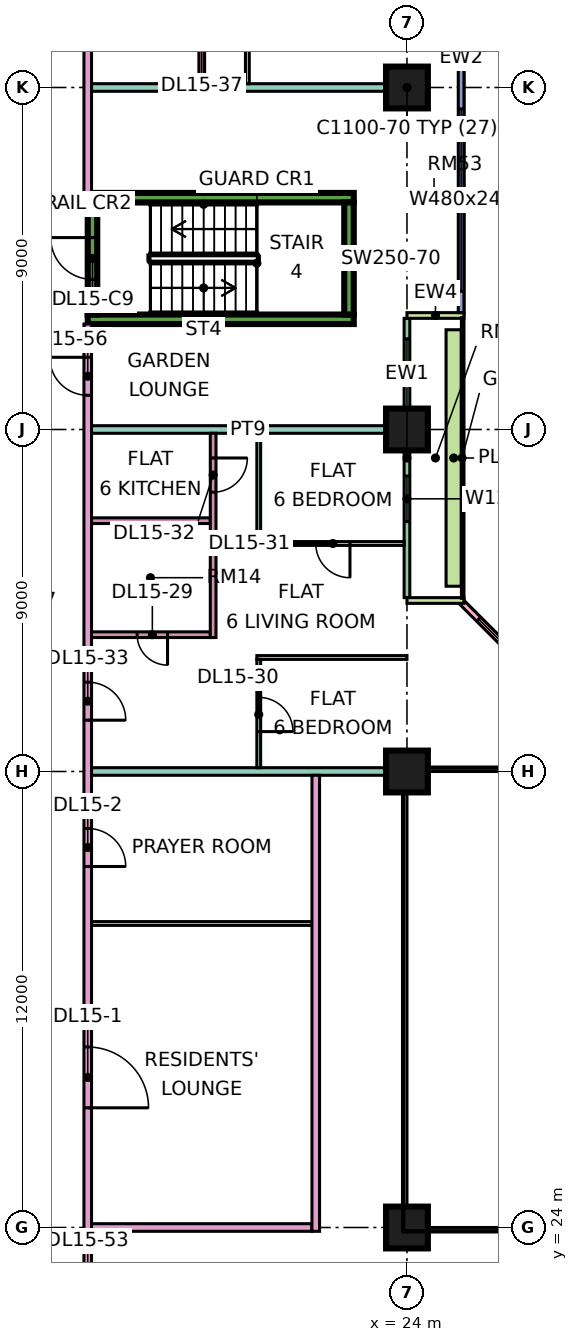
"""IFC4 building model, lengths in metres.
Left out: names, types, materials, properties, quantities, classifications, styles, units other than length and angle.
Written with IfcOpenShell. Run it as: python <this file> out.ifc"""

import sys

from ifc_helpers import new_model, si_unit, direction, frame, frame_2d, origin, origin_2d, place, context, subcontext, project, spatial, rectangle, extrude, element, fill, save


model = new_model("IFC4")
c1 = context("Model", 3, precision=1e-05, world=origin(), true_north=direction((0.0, 1.0)))
c2 = subcontext(c1, "Body", "Model", "MODEL_VIEW")
j1 = project(units=[si_unit("LENGTHUNIT", "METRE"), si_unit("PLANEANGLEUNIT", "RADIAN")], contexts=[c1])
p1 = place(None, origin())
s1 = spatial("IfcSite", under=j1, at=p1, CompositionType="ELEMENT")
p2 = place(p1, origin())
s2 = spatial("IfcBuilding", under=s1, at=p2, CompositionType="ELEMENT")
p3 = place(p2, frame((0.0, 0.0, 71.4)))
s3 = spatial("IfcBuildingStorey", under=s2, at=p3, CompositionType="ELEMENT", Elevation=71.4)
for number, where, z_axis, x_axis in (
    (1, (24.0, 24.0, 0.0), (0.0, 0.0, 1.0), (1.0, 0.0, 0.0)),
    (2, (24.0, 36.0, 0.0), (0.0, 0.0, 1.0), (1.0, 0.0, 0.0)),
    (3, (24.0, 45.0, 0.0), (0.0, 0.0, 1.0), (1.0, 0.0, 0.0)),
    (4, (24.0, 54.0, 0.0), (0.0, 0.0, 1.0), (1.0, 0.0, 0.0)),
):
    element("IfcColumn", number, at=place(p3, frame(where, z_axis=z_axis, x_axis=x_axis)), inside=s3, PredefinedType="COLUMN", context=c2, shape_type="SweptSolid", body=[
        extrude(rectangle(XDim=1.1, YDim=1.1, at=origin_2d()), origin(), (0.0, 0.0, 1.0), 3.75),
    ])
for number, where, z_axis, x_axis in (
    (5, (15.6, 47.9, 0.0), (0.0, 0.0, 1.0), (1.0, 0.0, 0.0)),
    (6, (15.6, 51.1, 0.0), (0.0, 0.0, 1.0), (1.0, 0.0, 0.0)),
):
    element("IfcWall", number, at=place(p3, frame(where, z_axis=z_axis, x_axis=x_axis)), inside=s3, PredefinedType="SHEAR", context=c2, shape_type="SweptSolid", body=[
        extrude(rectangle(XDim=7.0, YDim=0.25, at=frame_2d((3.5, 0.0))), origin(), (0.0, 0.0, 1.0), 3.75),
    ])
p4 = place(p3, frame((15.725, 48.025, 0.0), z_axis=(0.0, 0.0, 1.0), x_axis=(0.0, 1.0, 0.0)))
e7 = element("IfcWall", 7, at=p4, inside=s3, PredefinedType="SHEAR", context=c2, shape_type="SweptSolid", body=[
    extrude(rectangle(XDim=2.95, YDim=0.25, at=frame_2d((1.475, 0.0))), origin(), (0.0, 0.0, 1.0), 3.75),
])
p5 = place(p4, frame((0.925, 0.0, 0.0)))
e8 = element("IfcOpeningElement", 8, at=p5, cuts=e7, PredefinedType="OPENING", context=c2, shape_type="SweptSolid", body=[
    extrude(rectangle(XDim=1.1, YDim=2.2, at=frame_2d((0.55, 1.1))), frame((0.0, 0.135, 0.0), z_axis=(0.0, -1.0, 0.0), x_axis=(1.0, 0.0, 0.0)), (0.0, 0.0, 1.0), 0.27),
])
p6 = place(p3, frame((22.475, 48.025, 0.0), z_axis=(0.0, 0.0, 1.0), x_axis=(0.0, 1.0, 0.0)))
e9 = element("IfcWall", 9, at=p6, inside=s3, PredefinedType="SHEAR", context=c2, shape_type="SweptSolid", body=[
    extrude(rectangle(XDim=2.95, YDim=0.25, at=frame_2d((1.475, 0.0))), origin(), (0.0, 0.0, 1.0), 3.75),
])
p7 = place(p3, frame((28.447, 37.447, 0.0), z_axis=(0.0, 0.0, 1.0), x_axis=(-0.707106781187, 0.707106781187, 0.0)))
e10 = element("IfcWall", 10, at=p7, inside=s3, PredefinedType="SOLIDWALL", context=c2, shape_type="SweptSolid", body=[
    extrude(rectangle(XDim=4.243, YDim=0.15, at=frame_2d((2.121, 0.0))), origin(), (0.0, 0.0, 1.0), 3.35),
])
p8 = place(p7, frame((0.621, 0.0, 0.45)))
e11 = element("IfcOpeningElement", 11, at=p8, cuts=e10, PredefinedType="OPENING", context=c2, shape_type="SweptSolid", body=[
    extrude(rectangle(XDim=3.0, YDim=2.4, at=frame_2d((1.5, 1.2))), frame((0.0, 0.085, 0.0), z_axis=(0.0, -1.0, 0.0), x_axis=(1.0, 0.0, 0.0)), (0.0, 0.0, 1.0), 0.17),
])
p9 = place(p3, frame((24.0, 40.575, 0.0), z_axis=(0.0, 0.0, 1.0), x_axis=(0.0, 1.0, 0.0)))
e12 = element("IfcWall", 12, at=p9, inside=s3, PredefinedType="SOLIDWALL", context=c2, shape_type="SweptSolid", body=[
    extrude(rectangle(XDim=7.35, YDim=0.15, at=frame_2d((3.675, 0.0))), origin(), (0.0, 0.0, 1.0), 3.35),
])
p10 = place(p9, frame((2.0, 0.0, 0.45)))
e13 = element("IfcOpeningElement", 13, at=p10, cuts=e12, PredefinedType="OPENING", context=c2, shape_type="SweptSolid", body=[
    extrude(rectangle(XDim=1.2, YDim=2.4, at=frame_2d((0.6, 1.2))), frame((0.0, 0.085, 0.0), z_axis=(0.0, -1.0, 0.0), x_axis=(1.0, 0.0, 0.0)), (0.0, 0.0, 1.0), 0.17),
])
p11 = place(p9, frame((5.613, 0.0, 0.45)))
e14 = element("IfcOpeningElement", 14, at=p11, cuts=e12, PredefinedType="OPENING", context=c2, shape_type="SweptSolid", body=[
    extrude(rectangle(XDim=1.2, YDim=2.4, at=frame_2d((0.6, 1.2))), frame((0.0, 0.085, 0.0), z_axis=(0.0, -1.0, 0.0), x_axis=(1.0, 0.0, 0.0)), (0.0, 0.0, 1.0), 0.17),
])
for number, where, z_axis, x_axis in (
    (15, (25.5, 40.5, 0.0), (0.0, 0.0, 1.0), (-1.0, 0.0, 0.0)),
    (16, (25.5, 48.0, 0.0), (0.0, 0.0, 1.0), (-1.0, 0.0, 0.0)),
):
    element("IfcWall", number, at=place(p3, frame(where, z_axis=z_axis, x_axis=x_axis)), inside=s3, PredefinedType="SOLIDWALL", context=c2, shape_type="SweptSolid", body=[
        extrude(rectangle(XDim=1.5, YDim=0.15, at=frame_2d((0.75, 0.0))), origin(), (0.0, 0.0, 1.0), 3.35),
    ])
p12 = place(p3, frame((25.425, 48.075, 0.0), z_axis=(0.0, 0.0, 1.0), x_axis=(0.0, 1.0, 0.0)))
e17 = element("IfcWall", 17, at=p12, inside=s3, PredefinedType="SOLIDWALL", context=c2, shape_type="SweptSolid", body=[
    extrude(rectangle(XDim=13.425, YDim=0.15, at=frame_2d((6.712, 0.0))), origin(), (0.0, 0.0, 1.0), 3.35),
])
p13 = place(p12, frame((0.562, 0.0, 0.45)))
e18 = element("IfcOpeningElement", 18, at=p13, cuts=e17, PredefinedType="OPENING", context=c2, shape_type="SweptSolid", body=[
    extrude(rectangle(XDim=4.8, YDim=2.4, at=frame_2d((2.4, 1.2))), frame((0.0, 0.085, 0.0), z_axis=(0.0, -1.0, 0.0), x_axis=(1.0, 0.0, 0.0)), (0.0, 0.0, 1.0), 0.17),
])
p14 = place(p12, frame((6.525, 0.0, 0.45)))
e19 = element("IfcOpeningElement", 19, at=p14, cuts=e17, PredefinedType="OPENING", context=c2, shape_type="SweptSolid", body=[
    extrude(rectangle(XDim=1.8, YDim=2.4, at=frame_2d((0.9, 1.2))), frame((0.0, 0.085, 0.0), z_axis=(0.0, -1.0, 0.0), x_axis=(1.0, 0.0, 0.0)), (0.0, 0.0, 1.0), 0.17),
])
p15 = place(p12, frame((9.525, 0.0, 0.45)))
e20 = element("IfcOpeningElement", 20, at=p15, cuts=e17, PredefinedType="OPENING", context=c2, shape_type="SweptSolid", body=[
    extrude(rectangle(XDim=1.8, YDim=2.4, at=frame_2d((0.9, 1.2))), frame((0.0, 0.085, 0.0), z_axis=(0.0, -1.0, 0.0), x_axis=(1.0, 0.0, 0.0)), (0.0, 0.0, 1.0), 0.17),
])
p16 = place(p3, frame((25.229, 40.875, 0.0), z_axis=(0.0, 0.0, 1.0), x_axis=(0.0, 1.0, 0.0)))
e21 = element("IfcWall", 21, at=p16, inside=s3, PredefinedType="SOLIDWALL", context=c2, shape_type="SweptSolid", body=[
    extrude(rectangle(XDim=6.75, YDim=0.4, at=frame_2d((3.375, 0.0))), origin(), (0.0, 0.0, 1.0), 0.7),
])
p17 = place(p3, frame((15.6, 20.0, 0.0), z_axis=(0.0, 0.0, 1.0), x_axis=(0.0, 1.0, 0.0)))
e22 = element("IfcWall", 22, at=p17, inside=s3, PredefinedType="PARTITIONING", context=c2, shape_type="SweptSolid", body=[
    extrude(rectangle(XDim=27.775, YDim=0.2, at=frame_2d((13.887, 0.0))), origin(), (0.0, 0.0, 1.0), 3.35),
])
p18 = place(p17, frame((7.15, 0.0, 0.0)))
e23 = element("IfcOpeningElement", 23, at=p18, cuts=e22, PredefinedType="OPENING", context=c2, shape_type="SweptSolid", body=[
    extrude(rectangle(XDim=1.6, YDim=2.1, at=frame_2d((0.8, 1.05))), frame((0.0, 0.11, 0.0), z_axis=(0.0, -1.0, 0.0), x_axis=(1.0, 0.0, 0.0)), (0.0, 0.0, 1.0), 0.22),
])
p19 = place(p17, frame((13.5, 0.0, 0.0)))
e24 = element("IfcOpeningElement", 24, at=p19, cuts=e22, PredefinedType="OPENING", context=c2, shape_type="SweptSolid", body=[
    extrude(rectangle(XDim=1.0, YDim=2.1, at=frame_2d((0.5, 1.05))), frame((0.0, 0.11, 0.0), z_axis=(0.0, -1.0, 0.0), x_axis=(1.0, 0.0, 0.0)), (0.0, 0.0, 1.0), 0.22),
])
p20 = place(p17, frame((17.35, 0.0, 0.0)))
e25 = element("IfcOpeningElement", 25, at=p20, cuts=e22, PredefinedType="OPENING", context=c2, shape_type="SweptSolid", body=[
    extrude(rectangle(XDim=1.0, YDim=2.1, at=frame_2d((0.5, 1.05))), frame((0.0, 0.11, 0.0), z_axis=(0.0, -1.0, 0.0), x_axis=(1.0, 0.0, 0.0)), (0.0, 0.0, 1.0), 0.22),
])
p21 = place(p17, frame((1.15, 0.0, 0.0)))
e26 = element("IfcOpeningElement", 26, at=p21, cuts=e22, PredefinedType="OPENING", context=c2, shape_type="SweptSolid", body=[
    extrude(rectangle(XDim=1.8, YDim=2.1, at=frame_2d((0.9, 1.05))), frame((0.0, 0.11, 0.0), z_axis=(0.0, -1.0, 0.0), x_axis=(1.0, 0.0, 0.0)), (0.0, 0.0, 1.0), 0.22),
])
p22 = place(p17, frame((25.9, 0.0, 0.0)))
e27 = element("IfcOpeningElement", 27, at=p22, cuts=e22, PredefinedType="OPENING", context=c2, shape_type="SweptSolid", body=[
    extrude(rectangle(XDim=1.0, YDim=2.1, at=frame_2d((0.5, 1.05))), frame((0.0, 0.11, 0.0), z_axis=(0.0, -1.0, 0.0), x_axis=(1.0, 0.0, 0.0)), (0.0, 0.0, 1.0), 0.22),
])
p23 = place(p3, frame((15.6, 51.225, 0.0), z_axis=(0.0, 0.0, 1.0), x_axis=(0.0, 1.0, 0.0)))
e28 = element("IfcWall", 28, at=p23, inside=s3, PredefinedType="PARTITIONING", context=c2, shape_type="SweptSolid", body=[
    extrude(rectangle(XDim=11.701, YDim=0.2, at=frame_2d((5.851, 0.0))), origin(), (0.0, 0.0, 1.0), 3.35),
])
p24 = place(p23, frame((9.825, 0.0, 0.0)))
e29 = element("IfcOpeningElement", 29, at=p24, cuts=e28, PredefinedType="OPENING", context=c2, shape_type="SweptSolid", body=[
    extrude(rectangle(XDim=1.0, YDim=2.1, at=frame_2d((0.5, 1.05))), frame((0.0, 0.11, 0.0), z_axis=(0.0, -1.0, 0.0), x_axis=(1.0, 0.0, 0.0)), (0.0, 0.0, 1.0), 0.22),
])
p25 = place(p3, frame((15.7, 24.0, 0.0), z_axis=(0.0, 0.0, 1.0), x_axis=(1.0, 0.0, 0.0)))
e30 = element("IfcWall", 30, at=p25, inside=s3, PredefinedType="PARTITIONING", context=c2, shape_type="SweptSolid", body=[
    extrude(rectangle(XDim=5.8, YDim=0.2, at=frame_2d((2.9, 0.0))), origin(), (0.0, 0.0, 1.0), 3.35),
])
p26 = place(p3, frame((15.7, 32.0, 0.0), z_axis=(0.0, 0.0, 1.0), x_axis=(1.0, 0.0, 0.0)))
e31 = element("IfcWall", 31, at=p26, inside=s3, PredefinedType="PARTITIONING", context=c2, shape_type="SweptSolid", body=[
    extrude(rectangle(XDim=5.8, YDim=0.1, at=frame_2d((2.9, 0.0))), origin(), (0.0, 0.0, 1.0), 3.35),
])
p27 = place(p3, frame((15.7, 36.0, 0.0), z_axis=(0.0, 0.0, 1.0), x_axis=(1.0, 0.0, 0.0)))
e32 = element("IfcWall", 32, at=p27, inside=s3, PredefinedType="PARTITIONING", context=c2, shape_type="SweptSolid", body=[
    extrude(rectangle(XDim=8.3, YDim=0.2, at=frame_2d((4.15, 0.0))), origin(), (0.0, 0.0, 1.0), 3.35),
])
p28 = place(p3, frame((15.7, 39.6, 0.0), z_axis=(0.0, 0.0, 1.0), x_axis=(1.0, 0.0, 0.0)))
e33 = element("IfcWall", 33, at=p28, inside=s3, PredefinedType="PARTITIONING", context=c2, shape_type="SweptSolid", body=[
    extrude(rectangle(XDim=3.125, YDim=0.15, at=frame_2d((1.562, 0.0))), origin(), (0.0, 0.0, 1.0), 3.35),
])
p29 = place(p28, frame((1.2, 0.0, 0.0)))
e34 = element("IfcOpeningElement", 34, at=p29, cuts=e33, PredefinedType="OPENING", context=c2, shape_type="SweptSolid", body=[
    extrude(rectangle(XDim=0.8, YDim=2.1, at=frame_2d((0.4, 1.05))), frame((0.0, 0.085, 0.0), z_axis=(0.0, -1.0, 0.0), x_axis=(1.0, 0.0, 0.0)), (0.0, 0.0, 1.0), 0.17),
])
p30 = place(p3, frame((15.7, 42.6, 0.0), z_axis=(0.0, 0.0, 1.0), x_axis=(1.0, 0.0, 0.0)))
e35 = element("IfcWall", 35, at=p30, inside=s3, PredefinedType="PARTITIONING", context=c2, shape_type="SweptSolid", body=[
    extrude(rectangle(XDim=3.125, YDim=0.15, at=frame_2d((1.562, 0.0))), origin(), (0.0, 0.0, 1.0), 3.35),
])
p31 = place(p3, frame((15.7, 45.0, 0.0), z_axis=(0.0, 0.0, 1.0), x_axis=(1.0, 0.0, 0.0)))
e36 = element("IfcWall", 36, at=p31, inside=s3, PredefinedType="PARTITIONING", context=c2, shape_type="SweptSolid", body=[
    extrude(rectangle(XDim=8.226, YDim=0.2, at=frame_2d((4.113, 0.0))), origin(), (0.0, 0.0, 1.0), 3.35),
])
p32 = place(p3, frame((15.7, 54.0, 0.0), z_axis=(0.0, 0.0, 1.0), x_axis=(1.0, 0.0, 0.0)))
e37 = element("IfcWall", 37, at=p32, inside=s3, PredefinedType="PARTITIONING", context=c2, shape_type="SweptSolid", body=[
    extrude(rectangle(XDim=8.3, YDim=0.2, at=frame_2d((4.15, 0.0))), origin(), (0.0, 0.0, 1.0), 3.35),
])
p33 = place(p3, frame((18.6, 54.1, 0.0), z_axis=(0.0, 0.0, 1.0), x_axis=(0.0, 1.0, 0.0)))
e38 = element("IfcWall", 38, at=p33, inside=s3, PredefinedType="PARTITIONING", context=c2, shape_type="SweptSolid", body=[
    extrude(rectangle(XDim=5.975, YDim=0.15, at=frame_2d((2.987, 0.0))), origin(), (0.0, 0.0, 1.0), 3.35),
])
p34 = place(p33, frame((1.1, 0.0, 0.0)))
e39 = element("IfcOpeningElement", 39, at=p34, cuts=e38, PredefinedType="OPENING", context=c2, shape_type="SweptSolid", body=[
    extrude(rectangle(XDim=0.9, YDim=2.1, at=frame_2d((0.45, 1.05))), frame((0.0, 0.085, 0.0), z_axis=(0.0, -1.0, 0.0), x_axis=(1.0, 0.0, 0.0)), (0.0, 0.0, 1.0), 0.17),
])
p35 = place(p3, frame((18.9, 39.525, 0.0), z_axis=(0.0, 0.0, 1.0), x_axis=(0.0, 1.0, 0.0)))
e40 = element("IfcWall", 40, at=p35, inside=s3, PredefinedType="PARTITIONING", context=c2, shape_type="SweptSolid", body=[
    extrude(rectangle(XDim=5.375, YDim=0.15, at=frame_2d((2.688, 0.0))), origin(), (0.0, 0.0, 1.0), 3.35),
])
p36 = place(p35, frame((3.825, 0.0, 0.0)))
e41 = element("IfcOpeningElement", 41, at=p36, cuts=e40, PredefinedType="OPENING", context=c2, shape_type="SweptSolid", body=[
    extrude(rectangle(XDim=0.9, YDim=2.1, at=frame_2d((0.45, 1.05))), frame((0.0, 0.085, 0.0), z_axis=(0.0, -1.0, 0.0), x_axis=(1.0, 0.0, 0.0)), (0.0, 0.0, 1.0), 0.17),
])
p37 = place(p3, frame((19.8, 54.1, 0.0), z_axis=(0.0, 0.0, 1.0), x_axis=(0.0, 1.0, 0.0)))
e42 = element("IfcWall", 42, at=p37, inside=s3, PredefinedType="PARTITIONING", context=c2, shape_type="SweptSolid", body=[
    extrude(rectangle(XDim=5.95, YDim=0.1, at=frame_2d((2.975, 0.0))), origin(), (0.0, 0.0, 1.0), 3.35),
])
p38 = place(p37, frame((0.95, 0.0, 0.0)))
e43 = element("IfcOpeningElement", 43, at=p38, cuts=e42, PredefinedType="OPENING", context=c2, shape_type="SweptSolid", body=[
    extrude(rectangle(XDim=0.9, YDim=2.1, at=frame_2d((0.45, 1.05))), frame((0.0, 0.06, 0.0), z_axis=(0.0, -1.0, 0.0), x_axis=(1.0, 0.0, 0.0)), (0.0, 0.0, 1.0), 0.12),
])
p39 = place(p3, frame((20.05, 39.0, 0.0), z_axis=(0.0, 0.0, 1.0), x_axis=(1.0, 0.0, 0.0)))
e44 = element("IfcWall", 44, at=p39, inside=s3, PredefinedType="PARTITIONING", context=c2, shape_type="SweptSolid", body=[
    extrude(rectangle(XDim=3.95, YDim=0.1, at=frame_2d((1.975, 0.0))), origin(), (0.0, 0.0, 1.0), 3.35),
])
p40 = place(p3, frame((20.05, 42.0, 0.0), z_axis=(0.0, 0.0, 1.0), x_axis=(1.0, 0.0, 0.0)))
e45 = element("IfcWall", 45, at=p40, inside=s3, PredefinedType="PARTITIONING", context=c2, shape_type="SweptSolid", body=[
    extrude(rectangle(XDim=3.876, YDim=0.1, at=frame_2d((1.938, 0.0))), origin(), (0.0, 0.0, 1.0), 3.35),
])
p41 = place(p40, frame((1.55, 0.0, 0.0)))
e46 = element("IfcOpeningElement", 46, at=p41, cuts=e45, PredefinedType="OPENING", context=c2, shape_type="SweptSolid", body=[
    extrude(rectangle(XDim=0.9, YDim=2.1, at=frame_2d((0.45, 1.05))), frame((0.0, 0.06, 0.0), z_axis=(0.0, -1.0, 0.0), x_axis=(1.0, 0.0, 0.0)), (0.0, 0.0, 1.0), 0.12),
])
p42 = place(p3, frame((20.1, 36.1, 0.0), z_axis=(0.0, 0.0, 1.0), x_axis=(0.0, 1.0, 0.0)))
e47 = element("IfcWall", 47, at=p42, inside=s3, PredefinedType="PARTITIONING", context=c2, shape_type="SweptSolid", body=[
    extrude(rectangle(XDim=2.85, YDim=0.1, at=frame_2d((1.425, 0.0))), origin(), (0.0, 0.0, 1.0), 3.35),
])
p43 = place(p42, frame((0.95, 0.0, 0.0)))
e48 = element("IfcOpeningElement", 48, at=p43, cuts=e47, PredefinedType="OPENING", context=c2, shape_type="SweptSolid", body=[
    extrude(rectangle(XDim=0.9, YDim=2.1, at=frame_2d((0.45, 1.05))), frame((0.0, 0.06, 0.0), z_axis=(0.0, -1.0, 0.0), x_axis=(1.0, 0.0, 0.0)), (0.0, 0.0, 1.0), 0.12),
])
p44 = place(p3, frame((20.1, 42.05, 0.0), z_axis=(0.0, 0.0, 1.0), x_axis=(0.0, 1.0, 0.0)))
e49 = element("IfcWall", 49, at=p44, inside=s3, PredefinedType="PARTITIONING", context=c2, shape_type="SweptSolid", body=[
    extrude(rectangle(XDim=2.85, YDim=0.1, at=frame_2d((1.425, 0.0))), origin(), (0.0, 0.0, 1.0), 3.35),
])
p45 = place(p3, frame((21.6, 23.9, 0.0), z_axis=(0.0, 0.0, 1.0), x_axis=(0.0, 1.0, 0.0)))
e50 = element("IfcWall", 50, at=p45, inside=s3, PredefinedType="PARTITIONING", context=c2, shape_type="SweptSolid", body=[
    extrude(rectangle(XDim=12.0, YDim=0.2, at=frame_2d((6.0, 0.0))), origin(), (0.0, 0.0, 1.0), 3.35),
])
p46 = place(p8, origin())
e51 = element("IfcWindow", 51, at=p46, inside=s3, PartitioningType="SINGLE_PANEL", PredefinedType="WINDOW", context=c2, shape_type="SweptSolid", body=[
    extrude(rectangle(XDim=3.0, YDim=2.4, at=frame_2d((1.5, 1.2))), frame((0.0, 0.03, 0.0), z_axis=(0.0, -1.0, 0.0), x_axis=(1.0, 0.0, 0.0)), (0.0, 0.0, 1.0), 0.06),
])
fill(e11, e51)
p47 = place(p10, origin())
e52 = element("IfcWindow", 52, at=p47, inside=s3, PartitioningType="SINGLE_PANEL", PredefinedType="WINDOW", context=c2, shape_type="SweptSolid", body=[
    extrude(rectangle(XDim=1.2, YDim=2.4, at=frame_2d((0.6, 1.2))), frame((0.0, 0.03, 0.0), z_axis=(0.0, -1.0, 0.0), x_axis=(1.0, 0.0, 0.0)), (0.0, 0.0, 1.0), 0.06),
])
fill(e13, e52)
p48 = place(p11, origin())
e53 = element("IfcWindow", 53, at=p48, inside=s3, PartitioningType="SINGLE_PANEL", PredefinedType="WINDOW", context=c2, shape_type="SweptSolid", body=[
    extrude(rectangle(XDim=1.2, YDim=2.4, at=frame_2d((0.6, 1.2))), frame((0.0, 0.03, 0.0), z_axis=(0.0, -1.0, 0.0), x_axis=(1.0, 0.0, 0.0)), (0.0, 0.0, 1.0), 0.06),
])
fill(e14, e53)
p49 = place(p13, origin())
e54 = element("IfcWindow", 54, at=p49, inside=s3, PartitioningType="SINGLE_PANEL", PredefinedType="WINDOW", context=c2, shape_type="SweptSolid", body=[
    extrude(rectangle(XDim=4.8, YDim=2.4, at=frame_2d((2.4, 1.2))), frame((0.0, 0.03, 0.0), z_axis=(0.0, -1.0, 0.0), x_axis=(1.0, 0.0, 0.0)), (0.0, 0.0, 1.0), 0.06),
])
fill(e18, e54)
p50 = place(p14, origin())
e55 = element("IfcWindow", 55, at=p50, inside=s3, PartitioningType="SINGLE_PANEL", PredefinedType="WINDOW", context=c2, shape_type="SweptSolid", body=[
    extrude(rectangle(XDim=1.8, YDim=2.4, at=frame_2d((0.9, 1.2))), frame((0.0, 0.03, 0.0), z_axis=(0.0, -1.0, 0.0), x_axis=(1.0, 0.0, 0.0)), (0.0, 0.0, 1.0), 0.06),
])
fill(e19, e55)
p51 = place(p5, frame((1.1, 0.0, 0.0), z_axis=(0.0, 0.0, 1.0), x_axis=(-1.0, 0.0, 0.0)))
e56 = element("IfcDoor", 56, at=p51, inside=s3, OperationType="SINGLE_SWING_RIGHT", PredefinedType="DOOR", context=c2, shape_type="SweptSolid", body=[
    extrude(rectangle(XDim=1.1, YDim=2.2, at=frame_2d((0.55, 1.1))), frame((0.0, 0.025, 0.0), z_axis=(0.0, -1.0, 0.0), x_axis=(1.0, 0.0, 0.0)), (0.0, 0.0, 1.0), 0.05),
])
fill(e8, e56)
p52 = place(p18, frame((1.6, 0.0, 0.0), z_axis=(0.0, 0.0, 1.0), x_axis=(-1.0, 0.0, 0.0)))
e57 = element("IfcDoor", 57, at=p52, inside=s3, OperationType="DOUBLE_DOOR_SINGLE_SWING", PredefinedType="DOOR", context=c2, shape_type="SweptSolid", body=[
    extrude(rectangle(XDim=1.6, YDim=2.1, at=frame_2d((0.8, 1.05))), frame((0.0, 0.025, 0.0), z_axis=(0.0, -1.0, 0.0), x_axis=(1.0, 0.0, 0.0)), (0.0, 0.0, 1.0), 0.05),
])
fill(e23, e57)
p53 = place(p19, frame((1.0, 0.0, 0.0), z_axis=(0.0, 0.0, 1.0), x_axis=(-1.0, 0.0, 0.0)))
e58 = element("IfcDoor", 58, at=p53, inside=s3, OperationType="SINGLE_SWING_LEFT", PredefinedType="DOOR", context=c2, shape_type="SweptSolid", body=[
    extrude(rectangle(XDim=1.0, YDim=2.1, at=frame_2d((0.5, 1.05))), frame((0.0, 0.025, 0.0), z_axis=(0.0, -1.0, 0.0), x_axis=(1.0, 0.0, 0.0)), (0.0, 0.0, 1.0), 0.05),
])
fill(e24, e58)
p54 = place(p29, origin())
e59 = element("IfcDoor", 59, at=p54, inside=s3, OperationType="SINGLE_SWING_RIGHT", PredefinedType="DOOR", context=c2, shape_type="SweptSolid", body=[
    extrude(rectangle(XDim=0.8, YDim=2.1, at=frame_2d((0.4, 1.05))), frame((0.0, 0.025, 0.0), z_axis=(0.0, -1.0, 0.0), x_axis=(1.0, 0.0, 0.0)), (0.0, 0.0, 1.0), 0.05),
])
fill(e34, e59)
p55 = place(p43, frame((0.9, 0.0, 0.0), z_axis=(0.0, 0.0, 1.0), x_axis=(-1.0, 0.0, 0.0)))
e60 = element("IfcDoor", 60, at=p55, inside=s3, OperationType="SINGLE_SWING_LEFT", PredefinedType="DOOR", context=c2, shape_type="SweptSolid", body=[
    extrude(rectangle(XDim=0.9, YDim=2.1, at=frame_2d((0.45, 1.05))), frame((0.0, 0.025, 0.0), z_axis=(0.0, -1.0, 0.0), x_axis=(1.0, 0.0, 0.0)), (0.0, 0.0, 1.0), 0.05),
])
fill(e48, e60)
p56 = place(p41, origin())
e61 = element("IfcDoor", 61, at=p56, inside=s3, OperationType="SINGLE_SWING_RIGHT", PredefinedType="DOOR", context=c2, shape_type="SweptSolid", body=[
    extrude(rectangle(XDim=0.9, YDim=2.1, at=frame_2d((0.45, 1.05))), frame((0.0, 0.025, 0.0), z_axis=(0.0, -1.0, 0.0), x_axis=(1.0, 0.0, 0.0)), (0.0, 0.0, 1.0), 0.05),
])
fill(e46, e61)
p57 = place(p36, origin())
e62 = element("IfcDoor", 62, at=p57, inside=s3, OperationType="SINGLE_SWING_RIGHT", PredefinedType="DOOR", context=c2, shape_type="SweptSolid", body=[
    extrude(rectangle(XDim=0.9, YDim=2.1, at=frame_2d((0.45, 1.05))), frame((0.0, 0.025, 0.0), z_axis=(0.0, -1.0, 0.0), x_axis=(1.0, 0.0, 0.0)), (0.0, 0.0, 1.0), 0.05),
])
fill(e41, e62)
p58 = place(p20, frame((1.0, 0.0, 0.0), z_axis=(0.0, 0.0, 1.0), x_axis=(-1.0, 0.0, 0.0)))
e63 = element("IfcDoor", 63, at=p58, inside=s3, OperationType="SINGLE_SWING_LEFT", PredefinedType="DOOR", context=c2, shape_type="SweptSolid", body=[
    extrude(rectangle(XDim=1.0, YDim=2.1, at=frame_2d((0.5, 1.05))), frame((0.0, 0.025, 0.0), z_axis=(0.0, -1.0, 0.0), x_axis=(1.0, 0.0, 0.0)), (0.0, 0.0, 1.0), 0.05),
])
fill(e25, e63)
p59 = place(p22, frame((1.0, 0.0, 0.0), z_axis=(0.0, 0.0, 1.0), x_axis=(-1.0, 0.0, 0.0)))
e64 = element("IfcDoor", 64, at=p59, inside=s3, OperationType="SINGLE_SWING_RIGHT", PredefinedType="DOOR", context=c2, shape_type="SweptSolid", body=[
    extrude(rectangle(XDim=1.0, YDim=2.1, at=frame_2d((0.5, 1.05))), frame((0.0, 0.025, 0.0), z_axis=(0.0, -1.0, 0.0), x_axis=(1.0, 0.0, 0.0)), (0.0, 0.0, 1.0), 0.05),
])
fill(e27, e64)
save(model, sys.argv[1])
